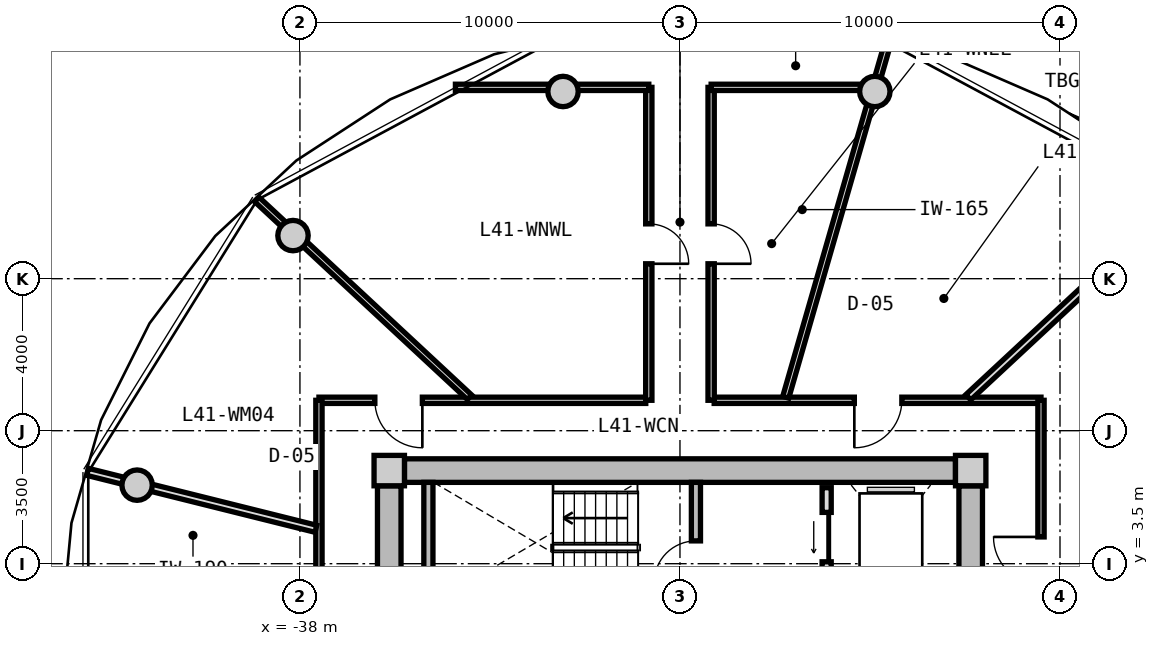
"""IFC4 building model, lengths in metres.
Left out: names, types, materials, properties, quantities, classifications, styles, units other than length and angle.
Written with IfcOpenShell. Run it as: python <this file> out.ifc"""

import sys

from ifc_helpers import new_model, si_unit, direction, frame, frame_2d, origin, origin_2d, place, context, subcontext, project, spatial, rectangle, circle, extrude, source, transform, mapped, element, fill, save


model = new_model("IFC4")
c1 = context("Model", 3, precision=1e-05, world=origin(), true_north=direction((0.0, 1.0)))
c2 = subcontext(c1, "Body", "Model", "MODEL_VIEW")
j1 = project(units=[si_unit("LENGTHUNIT", "METRE"), si_unit("PLANEANGLEUNIT", "RADIAN")], contexts=[c1])
p1 = place(None, origin())
s1 = spatial("IfcSite", under=j1, at=p1, CompositionType="ELEMENT")
p2 = place(p1, origin())
s2 = spatial("IfcBuilding", under=s1, at=p2, CompositionType="ELEMENT")
p3 = place(p2, frame((0.0, 0.0, 134.3)))
s3 = spatial("IfcBuildingStorey", under=s2, at=p3, CompositionType="ELEMENT", Elevation=134.3)
m1 = source(origin(), c2, "Body", "SweptSolid", [
    extrude(rectangle(XDim=0.8, YDim=0.8, at=origin_2d()), origin(), (0.0, 0.0, 1.0), 3.05),
])
for number, where, z_axis, x_axis in (
    (1, (-20.35, 5.95, 0.0), (0.0, 0.0, 1.0), (1.0, 0.0, 0.0)),
    (2, (-35.65, 5.95, 0.0), (0.0, 0.0, 1.0), (1.0, 0.0, 0.0)),
):
    element("IfcColumn", number, at=place(p3, frame(where, z_axis=z_axis, x_axis=x_axis)), inside=s3, PredefinedType="COLUMN", context=c2, shape_type="MappedRepresentation", body=[
        mapped(m1, transform((0.0, 0.0, 0.0), x_axis=(1.0, 0.0, 0.0), y_axis=(0.0, 1.0, 0.0), z_axis=(0.0, 0.0, 1.0), scale=1.0)),
    ])
m2 = source(origin(), c2, "Body", "SweptSolid", [
    extrude(rectangle(XDim=14.5, YDim=0.62, at=frame_2d((7.25, 0.0))), origin(), (0.0, 0.0, 1.0), 2.81),
])
p4 = place(p3, frame((-35.25, 5.95, 0.0), z_axis=(0.0, 0.0, 1.0), x_axis=(1.0, 0.0, 0.0)))
e3 = element("IfcWall", 3, at=p4, inside=s3, PredefinedType="SHEAR", context=c2, shape_type="MappedRepresentation", body=[
    mapped(m2, transform((0.0, 0.0, 0.0), x_axis=(1.0, 0.0, 0.0), y_axis=(0.0, 1.0, 0.0), z_axis=(0.0, 0.0, 1.0), scale=1.0)),
])
m3 = source(origin(), c2, "Body", "SweptSolid", [
    extrude(rectangle(XDim=11.1, YDim=0.62, at=frame_2d((5.55, 0.0))), origin(), (0.0, 0.0, 1.0), 2.81),
])
p5 = place(p3, frame((-35.65, -5.55, 0.0), z_axis=(0.0, 0.0, 1.0), x_axis=(0.0, 1.0, 0.0)))
e4 = element("IfcWall", 4, at=p5, inside=s3, PredefinedType="SHEAR", context=c2, shape_type="MappedRepresentation", body=[
    mapped(m3, transform((0.0, 0.0, 0.0), x_axis=(1.0, 0.0, 0.0), y_axis=(0.0, 1.0, 0.0), z_axis=(0.0, 0.0, 1.0), scale=1.0)),
])
p6 = place(p5, frame((3.8, 0.0, 0.0)))
e5 = element("IfcOpeningElement", 5, at=p6, cuts=e4, PredefinedType="OPENING", context=c2, shape_type="SweptSolid", body=[
    extrude(rectangle(XDim=1.2, YDim=2.15, at=frame_2d((0.6, 1.075))), frame((0.0, 0.32, 0.0), z_axis=(0.0, -1.0, 0.0), x_axis=(1.0, 0.0, 0.0)), (0.0, 0.0, 1.0), 0.64),
])
p7 = place(p3, frame((-20.35, 5.55, 0.0), z_axis=(0.0, 0.0, 1.0), x_axis=(0.0, -1.0, 0.0)))
e6 = element("IfcWall", 6, at=p7, inside=s3, PredefinedType="SHEAR", context=c2, shape_type="MappedRepresentation", body=[
    mapped(m3, transform((0.0, 0.0, 0.0), x_axis=(1.0, 0.0, 0.0), y_axis=(0.0, 1.0, 0.0), z_axis=(0.0, 0.0, 1.0), scale=1.0)),
])
p8 = place(p7, frame((5.65, 0.0, 0.0)))
e7 = element("IfcOpeningElement", 7, at=p8, cuts=e6, PredefinedType="OPENING", context=c2, shape_type="SweptSolid", body=[
    extrude(rectangle(XDim=1.2, YDim=2.15, at=frame_2d((0.6, 1.075))), frame((0.0, 0.32, 0.0), z_axis=(0.0, -1.0, 0.0), x_axis=(1.0, 0.0, 0.0)), (0.0, 0.0, 1.0), 0.64),
])
p9 = place(p7, frame((9.3, 0.0, 0.0)))
e8 = element("IfcOpeningElement", 8, at=p9, cuts=e6, PredefinedType="OPENING", context=c2, shape_type="SweptSolid", body=[
    extrude(rectangle(XDim=1.0, YDim=2.1, at=frame_2d((0.5, 1.05))), frame((0.0, 0.32, 0.0), z_axis=(0.0, -1.0, 0.0), x_axis=(1.0, 0.0, 0.0)), (0.0, 0.0, 1.0), 0.64),
])
m4 = source(origin(), c2, "Body", "SweptSolid", [
    extrude(circle(Radius=0.4, at=origin_2d()), origin(), (0.0, 0.0, 1.0), 3.47),
])
for number, where, z_axis, x_axis in (
    (9, (-22.873, 15.926, -0.42), (0.0, 0.0, 1.0), (1.0, 0.0, 0.0)),
    (10, (-31.077, 15.926, -0.42), (0.0, 0.0, 1.0), (1.0, 0.0, 0.0)),
    (11, (-38.183, 12.135, -0.42), (0.0, 0.0, 1.0), (1.0, 0.0, 0.0)),
    (12, (-42.285, 5.567, -0.42), (0.0, 0.0, 1.0), (1.0, 0.0, 0.0)),
):
    element("IfcColumn", number, at=place(p3, frame(where, z_axis=z_axis, x_axis=x_axis)), inside=s3, PredefinedType="COLUMN", context=c2, shape_type="MappedRepresentation", body=[
        mapped(m4, transform((0.0, 0.0, 0.0), x_axis=(1.0, 0.0, 0.0), y_axis=(0.0, 1.0, 0.0), z_axis=(0.0, 0.0, 1.0), scale=1.0)),
    ])
m5 = source(origin(), c2, "Body", "SweptSolid", [
    extrude(rectangle(XDim=3.19, YDim=0.24, at=frame_2d((1.595, 0.0))), origin(), (0.0, 0.0, 1.0), 2.81),
])
p10 = place(p3, frame((-34.62, 2.45, 0.0), z_axis=(0.0, 0.0, 1.0), x_axis=(0.0, 1.0, 0.0)))
e13 = element("IfcWall", 13, at=p10, inside=s3, PredefinedType="PARTITIONING", context=c2, shape_type="MappedRepresentation", body=[
    mapped(m5, transform((0.0, 0.0, 0.0), x_axis=(1.0, 0.0, 0.0), y_axis=(0.0, 1.0, 0.0), z_axis=(0.0, 0.0, 1.0), scale=1.0)),
])
p11 = place(p3, frame((-27.58, 2.45, 0.0), z_axis=(0.0, 0.0, 1.0), x_axis=(0.0, 1.0, 0.0)))
e14 = element("IfcWall", 14, at=p11, inside=s3, PredefinedType="PARTITIONING", context=c2, shape_type="MappedRepresentation", body=[
    mapped(m5, transform((0.0, 0.0, 0.0), x_axis=(1.0, 0.0, 0.0), y_axis=(0.0, 1.0, 0.0), z_axis=(0.0, 0.0, 1.0), scale=1.0)),
])
p12 = place(p11, frame((0.55, 0.0, 0.0)))
e15 = element("IfcOpeningElement", 15, at=p12, cuts=e14, PredefinedType="OPENING", context=c2, shape_type="SweptSolid", body=[
    extrude(rectangle(XDim=1.1, YDim=2.15, at=frame_2d((0.55, 1.075))), frame((0.0, 0.13, 0.0), z_axis=(0.0, -1.0, 0.0), x_axis=(1.0, 0.0, 0.0)), (0.0, 0.0, 1.0), 0.26),
])
m6 = source(origin(), c2, "Body", "SweptSolid", [
    extrude(rectangle(XDim=5.0, YDim=0.24, at=frame_2d((2.5, 0.0))), origin(), (0.0, 0.0, 1.0), 2.795),
])
p13 = place(p3, frame((-24.14, 0.5, 0.0), z_axis=(0.0, 0.0, 1.0), x_axis=(0.0, 1.0, 0.0)))
e16 = element("IfcWall", 16, at=p13, inside=s3, PredefinedType="PARTITIONING", context=c2, shape_type="MappedRepresentation", body=[
    mapped(m6, transform((0.0, 0.0, 0.0), x_axis=(1.0, 0.0, 0.0), y_axis=(0.0, 1.0, 0.0), z_axis=(0.0, 0.0, 1.0), scale=1.0)),
])
p14 = place(p13, frame((3.05, 0.0, 0.0)))
e17 = element("IfcOpeningElement", 17, at=p14, cuts=e16, PredefinedType="OPENING", context=c2, shape_type="SweptSolid", body=[
    extrude(rectangle(XDim=1.3, YDim=2.2, at=frame_2d((0.65, 1.1))), frame((0.0, 0.13, 0.0), z_axis=(0.0, -1.0, 0.0), x_axis=(1.0, 0.0, 0.0)), (0.0, 0.0, 1.0), 0.26),
])
p15 = place(p13, frame((0.55, 0.0, 0.0)))
e18 = element("IfcOpeningElement", 18, at=p15, cuts=e16, PredefinedType="OPENING", context=c2, shape_type="SweptSolid", body=[
    extrude(rectangle(XDim=1.3, YDim=2.2, at=frame_2d((0.65, 1.1))), frame((0.0, 0.13, 0.0), z_axis=(0.0, -1.0, 0.0), x_axis=(1.0, 0.0, 0.0)), (0.0, 0.0, 1.0), 0.26),
])
m7 = source(origin(), c2, "Body", "SweptSolid", [
    extrude(rectangle(XDim=8.6, YDim=0.165, at=frame_2d((4.3, 0.0))), origin(), (0.0, 0.0, 1.0), 2.795),
])
p16 = place(p3, frame((-37.5, 7.8, 0.0), z_axis=(0.0, 0.0, 1.0), x_axis=(1.0, 0.0, 0.0)))
e19 = element("IfcWall", 19, at=p16, inside=s3, PredefinedType="PARTITIONING", context=c2, shape_type="MappedRepresentation", body=[
    mapped(m7, transform((0.0, 0.0, 0.0), x_axis=(1.0, 0.0, 0.0), y_axis=(0.0, 1.0, 0.0), z_axis=(0.0, 0.0, 1.0), scale=1.0)),
])
p17 = place(p16, frame((1.471, 0.0, 0.0)))
e20 = element("IfcOpeningElement", 20, at=p17, cuts=e19, PredefinedType="OPENING", context=c2, shape_type="SweptSolid", body=[
    extrude(rectangle(XDim=1.25, YDim=2.2, at=frame_2d((0.625, 1.1))), frame((0.0, 0.093, 0.0), z_axis=(0.0, -1.0, 0.0), x_axis=(1.0, 0.0, 0.0)), (0.0, 0.0, 1.0), 0.185),
])
p18 = place(p3, frame((-27.1, 7.8, 0.0), z_axis=(0.0, 0.0, 1.0), x_axis=(1.0, 0.0, 0.0)))
e21 = element("IfcWall", 21, at=p18, inside=s3, PredefinedType="PARTITIONING", context=c2, shape_type="MappedRepresentation", body=[
    mapped(m7, transform((0.0, 0.0, 0.0), x_axis=(1.0, 0.0, 0.0), y_axis=(0.0, 1.0, 0.0), z_axis=(0.0, 0.0, 1.0), scale=1.0)),
])
p19 = place(p18, frame((3.688, 0.0, 0.0)))
e22 = element("IfcOpeningElement", 22, at=p19, cuts=e21, PredefinedType="OPENING", context=c2, shape_type="SweptSolid", body=[
    extrude(rectangle(XDim=1.25, YDim=2.2, at=frame_2d((0.625, 1.1))), frame((0.0, 0.093, 0.0), z_axis=(0.0, -1.0, 0.0), x_axis=(1.0, 0.0, 0.0)), (0.0, 0.0, 1.0), 0.185),
])
m8 = source(origin(), c2, "Body", "SweptSolid", [
    extrude(rectangle(XDim=15.6, YDim=0.165, at=frame_2d((7.8, 0.0))), origin(), (0.0, 0.0, 1.0), 2.795),
])
p20 = place(p3, frame((-37.5, -7.8, 0.0), z_axis=(0.0, 0.0, 1.0), x_axis=(0.0, 1.0, 0.0)))
e23 = element("IfcWall", 23, at=p20, inside=s3, PredefinedType="PARTITIONING", context=c2, shape_type="MappedRepresentation", body=[
    mapped(m8, transform((0.0, 0.0, 0.0), x_axis=(1.0, 0.0, 0.0), y_axis=(0.0, 1.0, 0.0), z_axis=(0.0, 0.0, 1.0), scale=1.0)),
])
p21 = place(p20, frame((8.95, 0.0, 0.0)))
e24 = element("IfcOpeningElement", 24, at=p21, cuts=e23, PredefinedType="OPENING", context=c2, shape_type="SweptSolid", body=[
    extrude(rectangle(XDim=1.25, YDim=2.2, at=frame_2d((0.625, 1.1))), frame((0.0, 0.093, 0.0), z_axis=(0.0, -1.0, 0.0), x_axis=(1.0, 0.0, 0.0)), (0.0, 0.0, 1.0), 0.185),
])
p22 = place(p20, frame((4.851, 0.0, 0.0)))
e25 = element("IfcOpeningElement", 25, at=p22, cuts=e23, PredefinedType="OPENING", context=c2, shape_type="SweptSolid", body=[
    extrude(rectangle(XDim=1.05, YDim=2.15, at=frame_2d((0.525, 1.075))), frame((0.0, 0.093, 0.0), z_axis=(0.0, -1.0, 0.0), x_axis=(1.0, 0.0, 0.0)), (0.0, 0.0, 1.0), 0.185),
])
p23 = place(p20, frame((1.488, 0.0, 0.0)))
e26 = element("IfcOpeningElement", 26, at=p23, cuts=e23, PredefinedType="OPENING", context=c2, shape_type="SweptSolid", body=[
    extrude(rectangle(XDim=1.05, YDim=2.15, at=frame_2d((0.525, 1.075))), frame((0.0, 0.093, 0.0), z_axis=(0.0, -1.0, 0.0), x_axis=(1.0, 0.0, 0.0)), (0.0, 0.0, 1.0), 0.185),
])
p24 = place(p3, frame((-18.5, 7.8, 0.0), z_axis=(0.0, 0.0, 1.0), x_axis=(0.0, -1.0, 0.0)))
e27 = element("IfcWall", 27, at=p24, inside=s3, PredefinedType="PARTITIONING", context=c2, shape_type="MappedRepresentation", body=[
    mapped(m8, transform((0.0, 0.0, 0.0), x_axis=(1.0, 0.0, 0.0), y_axis=(0.0, 1.0, 0.0), z_axis=(0.0, 0.0, 1.0), scale=1.0)),
])
p25 = place(p24, frame((10.881, 0.0, 0.0)))
e28 = element("IfcOpeningElement", 28, at=p25, cuts=e27, PredefinedType="OPENING", context=c2, shape_type="SweptSolid", body=[
    extrude(rectangle(XDim=1.05, YDim=2.15, at=frame_2d((0.525, 1.075))), frame((0.0, 0.093, 0.0), z_axis=(0.0, -1.0, 0.0), x_axis=(1.0, 0.0, 0.0)), (0.0, 0.0, 1.0), 0.185),
])
p26 = place(p24, frame((8.844, 0.0, 0.0)))
e29 = element("IfcOpeningElement", 29, at=p26, cuts=e27, PredefinedType="OPENING", context=c2, shape_type="SweptSolid", body=[
    extrude(rectangle(XDim=1.05, YDim=2.15, at=frame_2d((0.525, 1.075))), frame((0.0, 0.093, 0.0), z_axis=(0.0, -1.0, 0.0), x_axis=(1.0, 0.0, 0.0)), (0.0, 0.0, 1.0), 0.185),
])
p27 = place(p24, frame((3.596, 0.0, 0.0)))
e30 = element("IfcOpeningElement", 30, at=p27, cuts=e27, PredefinedType="OPENING", context=c2, shape_type="SweptSolid", body=[
    extrude(rectangle(XDim=1.25, YDim=2.2, at=frame_2d((0.625, 1.1))), frame((0.0, 0.093, 0.0), z_axis=(0.0, -1.0, 0.0), x_axis=(1.0, 0.0, 0.0)), (0.0, 0.0, 1.0), 0.185),
])
m9 = source(origin(), c2, "Body", "SweptSolid", [
    extrude(rectangle(XDim=9.73, YDim=0.165, at=frame_2d((4.865, 0.0))), origin(), (0.0, 0.0, 1.0), 2.345),
])
p28 = place(p3, frame((-25.217, 7.88, 0.0), z_axis=(0.0, 0.0, 1.0), x_axis=(0.27679492614, 0.960929013436, 0.0)))
e31 = element("IfcWall", 31, at=p28, inside=s3, PredefinedType="PARTITIONING", context=c2, shape_type="MappedRepresentation", body=[
    mapped(m9, transform((0.0, 0.0, 0.0), x_axis=(1.0, 0.0, 0.0), y_axis=(0.0, 1.0, 0.0), z_axis=(0.0, 0.0, 1.0), scale=1.0)),
])
m10 = source(origin(), c2, "Body", "SweptSolid", [
    extrude(rectangle(XDim=7.648, YDim=0.165, at=frame_2d((3.824, 0.0))), origin(), (0.0, 0.0, 1.0), 2.345),
])
p29 = place(p3, frame((-33.538, 7.88, 0.0), z_axis=(0.0, 0.0, 1.0), x_axis=(-0.732167856666, 0.681124239522, 0.0)))
e32 = element("IfcWall", 32, at=p29, inside=s3, PredefinedType="PARTITIONING", context=c2, shape_type="MappedRepresentation", body=[
    mapped(m10, transform((0.0, 0.0, 0.0), x_axis=(1.0, 0.0, 0.0), y_axis=(0.0, 1.0, 0.0), z_axis=(0.0, 0.0, 1.0), scale=1.0)),
])
m11 = source(origin(), c2, "Body", "SweptSolid", [
    extrude(rectangle(XDim=8.235, YDim=0.165, at=frame_2d((4.118, 0.0))), origin(), (0.0, 0.0, 1.0), 2.795),
])
p30 = place(p3, frame((-28.82, 7.8, 0.0), z_axis=(0.0, 0.0, 1.0), x_axis=(0.0, 1.0, 0.0)))
e33 = element("IfcWall", 33, at=p30, inside=s3, PredefinedType="PARTITIONING", context=c2, shape_type="MappedRepresentation", body=[
    mapped(m11, transform((0.0, 0.0, 0.0), x_axis=(1.0, 0.0, 0.0), y_axis=(0.0, 1.0, 0.0), z_axis=(0.0, 0.0, 1.0), scale=1.0)),
])
p31 = place(p30, frame((3.593, 0.0, 0.0)))
e34 = element("IfcOpeningElement", 34, at=p31, cuts=e33, PredefinedType="OPENING", context=c2, shape_type="SweptSolid", body=[
    extrude(rectangle(XDim=1.05, YDim=2.15, at=frame_2d((0.525, 1.075))), frame((0.0, 0.093, 0.0), z_axis=(0.0, -1.0, 0.0), x_axis=(1.0, 0.0, 0.0)), (0.0, 0.0, 1.0), 0.185),
])
m12 = source(origin(), c2, "Body", "SweptSolid", [
    extrude(rectangle(XDim=5.089, YDim=0.165, at=frame_2d((2.544, 0.0))), origin(), (0.0, 0.0, 1.0), 2.345),
])
p32 = place(p3, frame((-33.909, 16.035, 0.0), z_axis=(0.0, 0.0, 1.0), x_axis=(1.0, 0.0, 0.0)))
e35 = element("IfcWall", 35, at=p32, inside=s3, PredefinedType="PARTITIONING", context=c2, shape_type="MappedRepresentation", body=[
    mapped(m12, transform((0.0, 0.0, 0.0), x_axis=(1.0, 0.0, 0.0), y_axis=(0.0, 1.0, 0.0), z_axis=(0.0, 0.0, 1.0), scale=1.0)),
])
p33 = place(p3, frame((-27.18, 7.8, 0.0), z_axis=(0.0, 0.0, 1.0), x_axis=(0.0, 1.0, 0.0)))
e36 = element("IfcWall", 36, at=p33, inside=s3, PredefinedType="PARTITIONING", context=c2, shape_type="MappedRepresentation", body=[
    mapped(m11, transform((0.0, 0.0, 0.0), x_axis=(1.0, 0.0, 0.0), y_axis=(0.0, 1.0, 0.0), z_axis=(0.0, 0.0, 1.0), scale=1.0)),
])
p34 = place(p33, frame((3.593, 0.0, 0.0)))
e37 = element("IfcOpeningElement", 37, at=p34, cuts=e36, PredefinedType="OPENING", context=c2, shape_type="SweptSolid", body=[
    extrude(rectangle(XDim=1.05, YDim=2.15, at=frame_2d((0.525, 1.075))), frame((0.0, 0.093, 0.0), z_axis=(0.0, -1.0, 0.0), x_axis=(1.0, 0.0, 0.0)), (0.0, 0.0, 1.0), 0.185),
])
m13 = source(origin(), c2, "Body", "SweptSolid", [
    extrude(rectangle(XDim=4.469, YDim=0.165, at=frame_2d((2.234, 0.0))), origin(), (0.0, 0.0, 1.0), 2.345),
])
p35 = place(p3, frame((-27.18, 16.035, 0.0), z_axis=(0.0, 0.0, 1.0), x_axis=(1.0, 0.0, 0.0)))
e38 = element("IfcWall", 38, at=p35, inside=s3, PredefinedType="PARTITIONING", context=c2, shape_type="MappedRepresentation", body=[
    mapped(m13, transform((0.0, 0.0, 0.0), x_axis=(1.0, 0.0, 0.0), y_axis=(0.0, 1.0, 0.0), z_axis=(0.0, 0.0, 1.0), scale=1.0)),
])
m14 = source(origin(), c2, "Body", "SweptSolid", [
    extrude(rectangle(XDim=6.193, YDim=0.19, at=frame_2d((3.096, 0.0))), origin(), (0.0, 0.0, 1.0), 2.345),
])
p36 = place(p3, frame((-37.58, 4.419, 0.0), z_axis=(0.0, 0.0, 1.0), x_axis=(-0.970309243466, 0.241867674657, 0.0)))
e39 = element("IfcWall", 39, at=p36, inside=s3, PredefinedType="PARTITIONING", context=c2, shape_type="MappedRepresentation", body=[
    mapped(m14, transform((0.0, 0.0, 0.0), x_axis=(1.0, 0.0, 0.0), y_axis=(0.0, 1.0, 0.0), z_axis=(0.0, 0.0, 1.0), scale=1.0)),
])
m15 = source(origin(), c2, "Body", "SweptSolid", [
    extrude(rectangle(XDim=7.648, YDim=0.19, at=frame_2d((3.824, 0.0))), origin(), (0.0, 0.0, 1.0), 2.345),
])
p37 = place(p3, frame((-20.413, 7.88, 0.0), z_axis=(0.0, 0.0, 1.0), x_axis=(0.732182665826, 0.681108320213, 0.0)))
e40 = element("IfcWall", 40, at=p37, inside=s3, PredefinedType="PARTITIONING", context=c2, shape_type="MappedRepresentation", body=[
    mapped(m15, transform((0.0, 0.0, 0.0), x_axis=(1.0, 0.0, 0.0), y_axis=(0.0, 1.0, 0.0), z_axis=(0.0, 0.0, 1.0), scale=1.0)),
])
m16 = source(origin(), c2, "Body", "SweptSolid", [
    extrude(rectangle(XDim=1.1, YDim=2.15, at=frame_2d((0.55, 1.075))), frame((0.0, 0.025, 0.0), z_axis=(0.0, -1.0, 0.0), x_axis=(1.0, 0.0, 0.0)), (0.0, 0.0, 1.0), 0.05),
])
p38 = place(p12, origin())
e41 = element("IfcDoor", 41, at=p38, inside=s3, OperationType="SINGLE_SWING_LEFT", PredefinedType="DOOR", context=c2, shape_type="MappedRepresentation", body=[
    mapped(m16, transform((0.0, 0.0, 0.0), x_axis=(1.0, 0.0, 0.0), y_axis=(0.0, 1.0, 0.0), z_axis=(0.0, 0.0, 1.0), scale=1.0)),
])
fill(e15, e41)
m17 = source(origin(), c2, "Body", "SweptSolid", [
    extrude(rectangle(XDim=1.3, YDim=2.2, at=frame_2d((0.65, 1.1))), frame((0.0, 0.025, 0.0), z_axis=(0.0, -1.0, 0.0), x_axis=(1.0, 0.0, 0.0)), (0.0, 0.0, 1.0), 0.05),
])
p39 = place(p14, origin())
e42 = element("IfcDoor", 42, at=p39, inside=s3, OperationType="SLIDING_TO_LEFT", PredefinedType="DOOR", context=c2, shape_type="MappedRepresentation", body=[
    mapped(m17, transform((0.0, 0.0, 0.0), x_axis=(1.0, 0.0, 0.0), y_axis=(0.0, 1.0, 0.0), z_axis=(0.0, 0.0, 1.0), scale=1.0)),
])
fill(e17, e42)
m18 = source(origin(), c2, "Body", "SweptSolid", [
    extrude(rectangle(XDim=1.05, YDim=2.15, at=frame_2d((0.525, 1.075))), frame((0.0, 0.025, 0.0), z_axis=(0.0, -1.0, 0.0), x_axis=(1.0, 0.0, 0.0)), (0.0, 0.0, 1.0), 0.05),
])
p40 = place(p31, frame((1.05, 0.0, 0.0), z_axis=(0.0, 0.0, 1.0), x_axis=(-1.0, 0.0, 0.0)))
e43 = element("IfcDoor", 43, at=p40, inside=s3, OperationType="SINGLE_SWING_RIGHT", PredefinedType="DOOR", context=c2, shape_type="MappedRepresentation", body=[
    mapped(m18, transform((0.0, 0.0, 0.0), x_axis=(1.0, 0.0, 0.0), y_axis=(0.0, 1.0, 0.0), z_axis=(0.0, 0.0, 1.0), scale=1.0)),
])
fill(e34, e43)
p41 = place(p34, frame((1.05, 0.0, 0.0), z_axis=(0.0, 0.0, 1.0), x_axis=(-1.0, 0.0, 0.0)))
e44 = element("IfcDoor", 44, at=p41, inside=s3, OperationType="SINGLE_SWING_RIGHT", PredefinedType="DOOR", context=c2, shape_type="MappedRepresentation", body=[
    mapped(m18, transform((0.0, 0.0, 0.0), x_axis=(1.0, 0.0, 0.0), y_axis=(0.0, 1.0, 0.0), z_axis=(0.0, 0.0, 1.0), scale=1.0)),
])
fill(e37, e44)
m19 = source(origin(), c2, "Body", "SweptSolid", [
    extrude(rectangle(XDim=1.25, YDim=2.2, at=frame_2d((0.625, 1.1))), frame((0.0, 0.025, 0.0), z_axis=(0.0, -1.0, 0.0), x_axis=(1.0, 0.0, 0.0)), (0.0, 0.0, 1.0), 0.05),
])
p42 = place(p17, frame((1.25, 0.0, 0.0), z_axis=(0.0, 0.0, 1.0), x_axis=(-1.0, 0.0, 0.0)))
e45 = element("IfcDoor", 45, at=p42, inside=s3, OperationType="SINGLE_SWING_LEFT", PredefinedType="DOOR", context=c2, shape_type="MappedRepresentation", body=[
    mapped(m19, transform((0.0, 0.0, 0.0), x_axis=(1.0, 0.0, 0.0), y_axis=(0.0, 1.0, 0.0), z_axis=(0.0, 0.0, 1.0), scale=1.0)),
])
fill(e20, e45)
p43 = place(p27, frame((1.25, 0.0, 0.0), z_axis=(0.0, 0.0, 1.0), x_axis=(-1.0, 0.0, 0.0)))
e46 = element("IfcDoor", 46, at=p43, inside=s3, OperationType="SINGLE_SWING_RIGHT", PredefinedType="DOOR", context=c2, shape_type="MappedRepresentation", body=[
    mapped(m19, transform((0.0, 0.0, 0.0), x_axis=(1.0, 0.0, 0.0), y_axis=(0.0, 1.0, 0.0), z_axis=(0.0, 0.0, 1.0), scale=1.0)),
])
fill(e30, e46)
p44 = place(p19, frame((1.25, 0.0, 0.0), z_axis=(0.0, 0.0, 1.0), x_axis=(-1.0, 0.0, 0.0)))
e47 = element("IfcDoor", 47, at=p44, inside=s3, OperationType="SINGLE_SWING_RIGHT", PredefinedType="DOOR", context=c2, shape_type="MappedRepresentation", body=[
    mapped(m19, transform((0.0, 0.0, 0.0), x_axis=(1.0, 0.0, 0.0), y_axis=(0.0, 1.0, 0.0), z_axis=(0.0, 0.0, 1.0), scale=1.0)),
])
fill(e22, e47)
save(model, sys.argv[1])
